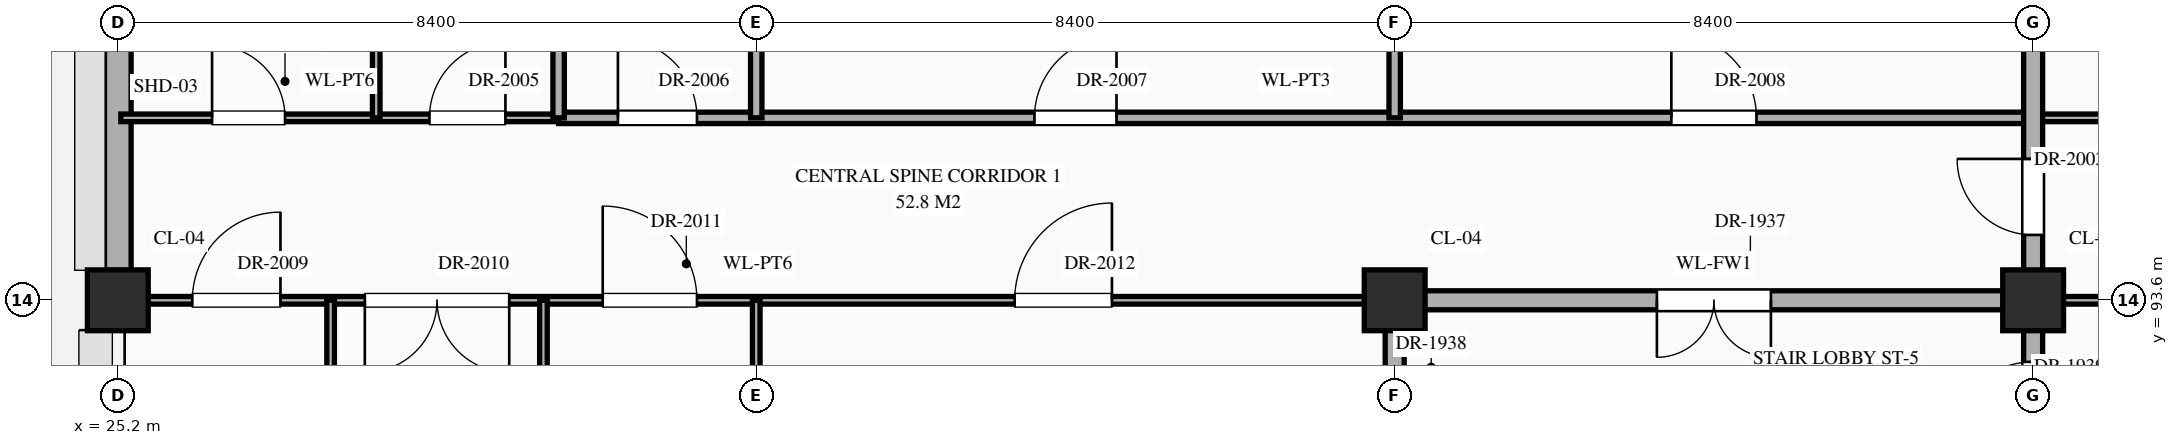
"""IFC4 building model, lengths in metres.
Left out: names, types, materials, properties, quantities, classifications, styles, units other than length and angle.
Written with IfcOpenShell. Run it as: python <this file> out.ifc"""

import sys

from ifc_helpers import new_model, si_unit, direction, frame, frame_2d, origin, origin_2d, place, context, subcontext, project, spatial, rectangle, extrude, element, fill, save


model = new_model("IFC4")
c1 = context("Model", 3, precision=1e-05, world=origin(), true_north=direction((0.0, 1.0)))
c2 = subcontext(c1, "Body", "Model", "MODEL_VIEW")
j1 = project(units=[si_unit("LENGTHUNIT", "METRE"), si_unit("PLANEANGLEUNIT", "RADIAN")], contexts=[c1])
p1 = place(None, origin())
s1 = spatial("IfcSite", under=j1, at=p1, CompositionType="ELEMENT")
p2 = place(p1, origin())
s2 = spatial("IfcBuilding", under=s1, at=p2, CompositionType="ELEMENT")
p3 = place(p2, frame((0.0, 0.0, 21.6)))
s3 = spatial("IfcBuildingStorey", under=s2, at=p3, CompositionType="ELEMENT", Elevation=21.6)
for number, where, z_axis, x_axis in (
    (1, (25.2, 93.6, 0.0), (0.0, 0.0, 1.0), (1.0, 0.0, 0.0)),
    (2, (42.0, 93.6, 0.0), (0.0, 0.0, 1.0), (1.0, 0.0, 0.0)),
    (3, (50.4, 93.6, 0.0), (0.0, 0.0, 1.0), (1.0, 0.0, 0.0)),
):
    element("IfcColumn", number, at=place(p3, frame(where, z_axis=z_axis, x_axis=x_axis)), inside=s3, PredefinedType="COLUMN", context=c2, shape_type="SweptSolid", body=[
        extrude(rectangle(XDim=0.8, YDim=0.8, at=origin_2d()), origin(), (0.0, 0.0, 1.0), 4.5),
    ])
p4 = place(p3, frame((25.2, 93.995, 0.0), z_axis=(0.0, 0.0, 1.0), x_axis=(0.0, 1.0, 0.0)))
e4 = element("IfcWall", 4, at=p4, inside=s3, PredefinedType="STANDARD", context=c2, shape_type="SweptSolid", body=[
    extrude(rectangle(XDim=6.41, YDim=0.35, at=frame_2d((3.205, 0.0))), origin(), (0.0, 0.0, 1.0), 3.59),
])
p5 = place(p4, frame((3.905, 0.0, 0.85)))
e5 = element("IfcOpeningElement", 5, at=p5, cuts=e4, PredefinedType="OPENING", context=c2, shape_type="SweptSolid", body=[
    extrude(rectangle(XDim=1.2, YDim=1.74, at=frame_2d((0.6, 0.87))), frame((0.0, 0.187, 0.0), z_axis=(0.0, -1.0, 0.0), x_axis=(1.0, 0.0, 0.0)), (0.0, 0.0, 1.0), 0.374),
])
p6 = place(p3, frame((25.24, 93.6, 0.0), z_axis=(0.0, 0.0, 1.0), x_axis=(1.0, 0.0, 0.0)))
e6 = element("IfcWall", 6, at=p6, inside=s3, PredefinedType="STANDARD", context=c2, shape_type="SweptSolid", body=[
    extrude(rectangle(XDim=16.76, YDim=0.1, at=frame_2d((8.38, 0.0))), origin(), (0.0, 0.0, 1.0), 3.19),
])
p7 = place(p6, frame((0.94, 0.0, 0.0)))
e7 = element("IfcOpeningElement", 7, at=p7, cuts=e6, PredefinedType="OPENING", context=c2, shape_type="SweptSolid", body=[
    extrude(rectangle(XDim=1.16, YDim=2.3, at=frame_2d((0.58, 1.15))), frame((0.0, 0.062, 0.0), z_axis=(0.0, -1.0, 0.0), x_axis=(1.0, 0.0, 0.0)), (0.0, 0.0, 1.0), 0.124),
])
p8 = place(p6, frame((3.21, 0.0, 0.0)))
e8 = element("IfcOpeningElement", 8, at=p8, cuts=e6, PredefinedType="OPENING", context=c2, shape_type="SweptSolid", body=[
    extrude(rectangle(XDim=1.9, YDim=2.5, at=frame_2d((0.95, 1.25))), frame((0.0, 0.062, 0.0), z_axis=(0.0, -1.0, 0.0), x_axis=(1.0, 0.0, 0.0)), (0.0, 0.0, 1.0), 0.124),
])
p9 = place(p6, frame((6.34, 0.0, 0.0)))
e9 = element("IfcOpeningElement", 9, at=p9, cuts=e6, PredefinedType="OPENING", context=c2, shape_type="SweptSolid", body=[
    extrude(rectangle(XDim=1.24, YDim=2.3, at=frame_2d((0.62, 1.15))), frame((0.0, 0.062, 0.0), z_axis=(0.0, -1.0, 0.0), x_axis=(1.0, 0.0, 0.0)), (0.0, 0.0, 1.0), 0.124),
])
p10 = place(p6, frame((11.76, 0.0, 0.0)))
e10 = element("IfcOpeningElement", 10, at=p10, cuts=e6, PredefinedType="OPENING", context=c2, shape_type="SweptSolid", body=[
    extrude(rectangle(XDim=1.28, YDim=2.35, at=frame_2d((0.64, 1.175))), frame((0.0, 0.062, 0.0), z_axis=(0.0, -1.0, 0.0), x_axis=(1.0, 0.0, 0.0)), (0.0, 0.0, 1.0), 0.124),
])
p11 = place(p3, frame((42.0, 93.6, 0.0), z_axis=(0.0, 0.0, 1.0), x_axis=(1.0, 0.0, 0.0)))
e11 = element("IfcWall", 11, at=p11, inside=s3, PredefinedType="STANDARD", context=c2, shape_type="SweptSolid", body=[
    extrude(rectangle(XDim=8.4, YDim=0.25, at=frame_2d((4.2, 0.0))), origin(), (0.0, 0.0, 1.0), 3.39),
])
p12 = place(p11, frame((3.45, 0.0, 0.0)))
e12 = element("IfcOpeningElement", 12, at=p12, cuts=e11, PredefinedType="OPENING", context=c2, shape_type="SweptSolid", body=[
    extrude(rectangle(XDim=1.5, YDim=2.25, at=frame_2d((0.75, 1.125))), frame((0.0, 0.137, 0.0), z_axis=(0.0, -1.0, 0.0), x_axis=(1.0, 0.0, 0.0)), (0.0, 0.0, 1.0), 0.274),
])
p13 = place(p3, frame((50.4, 93.6, 0.0), z_axis=(0.0, 0.0, 1.0), x_axis=(1.0, 0.0, 0.0)))
e13 = element("IfcWall", 13, at=p13, inside=s3, PredefinedType="STANDARD", context=c2, shape_type="SweptSolid", body=[
    extrude(rectangle(XDim=8.4, YDim=0.1, at=frame_2d((4.2, 0.0))), origin(), (0.0, 0.0, 1.0), 3.39),
])
p14 = place(p13, frame((1.1, 0.0, 0.0)))
e14 = element("IfcOpeningElement", 14, at=p14, cuts=e13, PredefinedType="OPENING", context=c2, shape_type="SweptSolid", body=[
    extrude(rectangle(XDim=0.92, YDim=2.15, at=frame_2d((0.46, 1.075))), frame((0.0, 0.062, 0.0), z_axis=(0.0, -1.0, 0.0), x_axis=(1.0, 0.0, 0.0)), (0.0, 0.0, 1.0), 0.124),
])
p15 = place(p13, frame((3.72, 0.0, 0.0)))
e15 = element("IfcOpeningElement", 15, at=p15, cuts=e13, PredefinedType="OPENING", context=c2, shape_type="SweptSolid", body=[
    extrude(rectangle(XDim=0.96, YDim=2.2, at=frame_2d((0.48, 1.1))), frame((0.0, 0.062, 0.0), z_axis=(0.0, -1.0, 0.0), x_axis=(1.0, 0.0, 0.0)), (0.0, 0.0, 1.0), 0.124),
])
p16 = place(p13, frame((6.34, 0.0, 0.0)))
e16 = element("IfcOpeningElement", 16, at=p16, cuts=e13, PredefinedType="OPENING", context=c2, shape_type="SweptSolid", body=[
    extrude(rectangle(XDim=1.0, YDim=2.25, at=frame_2d((0.5, 1.125))), frame((0.0, 0.062, 0.0), z_axis=(0.0, -1.0, 0.0), x_axis=(1.0, 0.0, 0.0)), (0.0, 0.0, 1.0), 0.124),
])
p17 = place(p3, frame((25.24, 96.0, 0.0), z_axis=(0.0, 0.0, 1.0), x_axis=(1.0, 0.0, 0.0)))
e17 = element("IfcWall", 17, at=p17, inside=s3, PredefinedType="STANDARD", context=c2, shape_type="SweptSolid", body=[
    extrude(rectangle(XDim=5.76, YDim=0.1, at=frame_2d((2.88, 0.0))), origin(), (0.0, 0.0, 1.0), 4.24),
])
p18 = place(p17, frame((1.2, 0.0, 0.0)))
e18 = element("IfcOpeningElement", 18, at=p18, cuts=e17, PredefinedType="OPENING", context=c2, shape_type="SweptSolid", body=[
    extrude(rectangle(XDim=0.96, YDim=2.2, at=frame_2d((0.48, 1.1))), frame((0.0, 0.062, 0.0), z_axis=(0.0, -1.0, 0.0), x_axis=(1.0, 0.0, 0.0)), (0.0, 0.0, 1.0), 0.124),
])
p19 = place(p17, frame((4.06, 0.0, 0.0)))
e19 = element("IfcOpeningElement", 19, at=p19, cuts=e17, PredefinedType="OPENING", context=c2, shape_type="SweptSolid", body=[
    extrude(rectangle(XDim=1.0, YDim=2.25, at=frame_2d((0.5, 1.125))), frame((0.0, 0.062, 0.0), z_axis=(0.0, -1.0, 0.0), x_axis=(1.0, 0.0, 0.0)), (0.0, 0.0, 1.0), 0.124),
])
p20 = place(p3, frame((31.0, 96.0, 0.0), z_axis=(0.0, 0.0, 1.0), x_axis=(1.0, 0.0, 0.0)))
e20 = element("IfcWall", 20, at=p20, inside=s3, PredefinedType="STANDARD", context=c2, shape_type="SweptSolid", body=[
    extrude(rectangle(XDim=19.4, YDim=0.15, at=frame_2d((9.7, 0.0))), origin(), (0.0, 0.0, 1.0), 4.24),
])
p21 = place(p20, frame((0.78, 0.0, 0.0)))
e21 = element("IfcOpeningElement", 21, at=p21, cuts=e20, PredefinedType="OPENING", context=c2, shape_type="SweptSolid", body=[
    extrude(rectangle(XDim=1.04, YDim=2.2, at=frame_2d((0.52, 1.1))), frame((0.0, 0.087, 0.0), z_axis=(0.0, -1.0, 0.0), x_axis=(1.0, 0.0, 0.0)), (0.0, 0.0, 1.0), 0.174),
])
p22 = place(p20, frame((6.26, 0.0, 0.0)))
e22 = element("IfcOpeningElement", 22, at=p22, cuts=e20, PredefinedType="OPENING", context=c2, shape_type="SweptSolid", body=[
    extrude(rectangle(XDim=1.08, YDim=2.25, at=frame_2d((0.54, 1.125))), frame((0.0, 0.087, 0.0), z_axis=(0.0, -1.0, 0.0), x_axis=(1.0, 0.0, 0.0)), (0.0, 0.0, 1.0), 0.174),
])
p23 = place(p20, frame((14.64, 0.0, 0.0)))
e23 = element("IfcOpeningElement", 23, at=p23, cuts=e20, PredefinedType="OPENING", context=c2, shape_type="SweptSolid", body=[
    extrude(rectangle(XDim=1.12, YDim=2.25, at=frame_2d((0.56, 1.125))), frame((0.0, 0.087, 0.0), z_axis=(0.0, -1.0, 0.0), x_axis=(1.0, 0.0, 0.0)), (0.0, 0.0, 1.0), 0.174),
])
p24 = place(p3, frame((50.4, 96.0, 0.0), z_axis=(0.0, 0.0, 1.0), x_axis=(1.0, 0.0, 0.0)))
e24 = element("IfcWall", 24, at=p24, inside=s3, PredefinedType="STANDARD", context=c2, shape_type="SweptSolid", body=[
    extrude(rectangle(XDim=5.8, YDim=0.1, at=frame_2d((2.9, 0.0))), origin(), (0.0, 0.0, 1.0), 4.24),
])
p25 = place(p24, frame((1.21, 0.0, 0.0)))
e25 = element("IfcOpeningElement", 25, at=p25, cuts=e24, PredefinedType="OPENING", context=c2, shape_type="SweptSolid", body=[
    extrude(rectangle(XDim=0.98, YDim=2.35, at=frame_2d((0.49, 1.175))), frame((0.0, 0.062, 0.0), z_axis=(0.0, -1.0, 0.0), x_axis=(1.0, 0.0, 0.0)), (0.0, 0.0, 1.0), 0.124),
])
p26 = place(p24, frame((4.09, 0.0, 0.0)))
e26 = element("IfcOpeningElement", 26, at=p26, cuts=e24, PredefinedType="OPENING", context=c2, shape_type="SweptSolid", body=[
    extrude(rectangle(XDim=1.02, YDim=2.4, at=frame_2d((0.51, 1.2))), frame((0.0, 0.062, 0.0), z_axis=(0.0, -1.0, 0.0), x_axis=(1.0, 0.0, 0.0)), (0.0, 0.0, 1.0), 0.124),
])
p27 = place(p3, frame((28.0, 86.4, 0.0), z_axis=(0.0, 0.0, 1.0), x_axis=(0.0, 1.0, 0.0)))
e27 = element("IfcWall", 27, at=p27, inside=s3, PredefinedType="STANDARD", context=c2, shape_type="SweptSolid", body=[
    extrude(rectangle(XDim=7.2, YDim=0.1, at=frame_2d((3.6, 0.0))), origin(), (0.0, 0.0, 1.0), 4.24),
])
p28 = place(p27, frame((3.08, 0.0, 0.0)))
e28 = element("IfcOpeningElement", 28, at=p28, cuts=e27, PredefinedType="OPENING", context=c2, shape_type="SweptSolid", body=[
    extrude(rectangle(XDim=1.04, YDim=2.2, at=frame_2d((0.52, 1.1))), frame((0.0, 0.062, 0.0), z_axis=(0.0, -1.0, 0.0), x_axis=(1.0, 0.0, 0.0)), (0.0, 0.0, 1.0), 0.124),
])
p29 = place(p3, frame((28.6, 96.0, 0.0), z_axis=(0.0, 0.0, 1.0), x_axis=(0.0, 1.0, 0.0)))
e29 = element("IfcWall", 29, at=p29, inside=s3, PredefinedType="STANDARD", context=c2, shape_type="SweptSolid", body=[
    extrude(rectangle(XDim=4.8, YDim=0.1, at=frame_2d((2.4, 0.0))), origin(), (0.0, 0.0, 1.0), 4.24),
])
p30 = place(p29, frame((1.93, 0.0, 0.0)))
e30 = element("IfcOpeningElement", 30, at=p30, cuts=e29, PredefinedType="OPENING", context=c2, shape_type="SweptSolid", body=[
    extrude(rectangle(XDim=0.94, YDim=2.3, at=frame_2d((0.47, 1.15))), frame((0.0, 0.062, 0.0), z_axis=(0.0, -1.0, 0.0), x_axis=(1.0, 0.0, 0.0)), (0.0, 0.0, 1.0), 0.124),
])
p31 = place(p3, frame((30.8, 86.4, 0.0), z_axis=(0.0, 0.0, 1.0), x_axis=(0.0, 1.0, 0.0)))
e31 = element("IfcWall", 31, at=p31, inside=s3, PredefinedType="STANDARD", context=c2, shape_type="SweptSolid", body=[
    extrude(rectangle(XDim=7.2, YDim=0.1, at=frame_2d((3.6, 0.0))), origin(), (0.0, 0.0, 1.0), 4.24),
])
p32 = place(p31, frame((3.04, 0.0, 0.0)))
e32 = element("IfcOpeningElement", 32, at=p32, cuts=e31, PredefinedType="OPENING", context=c2, shape_type="SweptSolid", body=[
    extrude(rectangle(XDim=1.12, YDim=2.25, at=frame_2d((0.56, 1.125))), frame((0.0, 0.062, 0.0), z_axis=(0.0, -1.0, 0.0), x_axis=(1.0, 0.0, 0.0)), (0.0, 0.0, 1.0), 0.124),
])
p33 = place(p3, frame((31.0, 96.0, 0.0), z_axis=(0.0, 0.0, 1.0), x_axis=(0.0, 1.0, 0.0)))
e33 = element("IfcWall", 33, at=p33, inside=s3, PredefinedType="STANDARD", context=c2, shape_type="SweptSolid", body=[
    extrude(rectangle(XDim=4.8, YDim=0.15, at=frame_2d((2.4, 0.0))), origin(), (0.0, 0.0, 1.0), 4.24),
])
p34 = place(p33, frame((1.91, 0.0, 0.0)))
e34 = element("IfcOpeningElement", 34, at=p34, cuts=e33, PredefinedType="OPENING", context=c2, shape_type="SweptSolid", body=[
    extrude(rectangle(XDim=0.98, YDim=2.35, at=frame_2d((0.49, 1.175))), frame((0.0, 0.087, 0.0), z_axis=(0.0, -1.0, 0.0), x_axis=(1.0, 0.0, 0.0)), (0.0, 0.0, 1.0), 0.174),
])
p35 = place(p3, frame((33.6, 86.4, 0.0), z_axis=(0.0, 0.0, 1.0), x_axis=(0.0, 1.0, 0.0)))
e35 = element("IfcWall", 35, at=p35, inside=s3, PredefinedType="STANDARD", context=c2, shape_type="SweptSolid", body=[
    extrude(rectangle(XDim=7.2, YDim=0.1, at=frame_2d((3.6, 0.0))), origin(), (0.0, 0.0, 1.0), 4.24),
])
p36 = place(p3, frame((33.6, 96.0, 0.0), z_axis=(0.0, 0.0, 1.0), x_axis=(0.0, 1.0, 0.0)))
e36 = element("IfcWall", 36, at=p36, inside=s3, PredefinedType="STANDARD", context=c2, shape_type="SweptSolid", body=[
    extrude(rectangle(XDim=4.8, YDim=0.15, at=frame_2d((2.4, 0.0))), origin(), (0.0, 0.0, 1.0), 4.24),
])
p37 = place(p3, frame((42.0, 91.2, 0.0), z_axis=(0.0, 0.0, 1.0), x_axis=(0.0, 1.0, 0.0)))
e37 = element("IfcWall", 37, at=p37, inside=s3, PredefinedType="STANDARD", context=c2, shape_type="SweptSolid", body=[
    extrude(rectangle(XDim=2.4, YDim=0.25, at=frame_2d((1.2, 0.0))), origin(), (0.0, 0.0, 1.0), 3.49),
])
p38 = place(p37, frame((0.565, 0.0, 0.0)))
e38 = element("IfcOpeningElement", 38, at=p38, cuts=e37, PredefinedType="OPENING", context=c2, shape_type="SweptSolid", body=[
    extrude(rectangle(XDim=0.95, YDim=2.15, at=frame_2d((0.475, 1.075))), frame((0.0, 0.137, 0.0), z_axis=(0.0, -1.0, 0.0), x_axis=(1.0, 0.0, 0.0)), (0.0, 0.0, 1.0), 0.274),
])
p39 = place(p3, frame((42.0, 96.0, 0.0), z_axis=(0.0, 0.0, 1.0), x_axis=(0.0, 1.0, 0.0)))
e39 = element("IfcWall", 39, at=p39, inside=s3, PredefinedType="STANDARD", context=c2, shape_type="SweptSolid", body=[
    extrude(rectangle(XDim=4.8, YDim=0.15, at=frame_2d((2.4, 0.0))), origin(), (0.0, 0.0, 1.0), 3.49),
])
p40 = place(p3, frame((50.4, 91.2, 0.0), z_axis=(0.0, 0.0, 1.0), x_axis=(0.0, 1.0, 0.0)))
e40 = element("IfcWall", 40, at=p40, inside=s3, PredefinedType="STANDARD", context=c2, shape_type="SweptSolid", body=[
    extrude(rectangle(XDim=13.2, YDim=0.25, at=frame_2d((6.6, 0.0))), origin(), (0.0, 0.0, 1.0), 3.49),
])
p41 = place(p40, frame((0.49, 0.0, 0.0)))
e41 = element("IfcOpeningElement", 41, at=p41, cuts=e40, PredefinedType="OPENING", context=c2, shape_type="SweptSolid", body=[
    extrude(rectangle(XDim=1.1, YDim=2.2, at=frame_2d((0.55, 1.1))), frame((0.0, 0.137, 0.0), z_axis=(0.0, -1.0, 0.0), x_axis=(1.0, 0.0, 0.0)), (0.0, 0.0, 1.0), 0.274),
])
p42 = place(p40, frame((10.485, 0.0, 0.0)))
e42 = element("IfcOpeningElement", 42, at=p42, cuts=e40, PredefinedType="OPENING", context=c2, shape_type="SweptSolid", body=[
    extrude(rectangle(XDim=0.95, YDim=2.15, at=frame_2d((0.475, 1.075))), frame((0.0, 0.137, 0.0), z_axis=(0.0, -1.0, 0.0), x_axis=(1.0, 0.0, 0.0)), (0.0, 0.0, 1.0), 0.274),
])
p43 = place(p40, frame((3.26, 0.0, 0.0)))
e43 = element("IfcOpeningElement", 43, at=p43, cuts=e40, PredefinedType="OPENING", context=c2, shape_type="SweptSolid", body=[
    extrude(rectangle(XDim=1.0, YDim=2.2, at=frame_2d((0.5, 1.1))), frame((0.0, 0.137, 0.0), z_axis=(0.0, -1.0, 0.0), x_axis=(1.0, 0.0, 0.0)), (0.0, 0.0, 1.0), 0.274),
])
p44 = place(p12, frame((1.5, 0.0, 0.0), z_axis=(0.0, 0.0, 1.0), x_axis=(-1.0, 0.0, 0.0)))
e44 = element("IfcDoor", 44, at=p44, inside=s3, OperationType="DOUBLE_DOOR_SINGLE_SWING", PredefinedType="DOOR", context=c2, shape_type="SweptSolid", body=[
    extrude(rectangle(XDim=1.5, YDim=2.25, at=frame_2d((0.75, 1.125))), frame((0.0, 0.025, 0.0), z_axis=(0.0, -1.0, 0.0), x_axis=(1.0, 0.0, 0.0)), (0.0, 0.0, 1.0), 0.05),
])
fill(e12, e44)
p45 = place(p41, origin())
e45 = element("IfcDoor", 45, at=p45, inside=s3, OperationType="SINGLE_SWING_LEFT", PredefinedType="DOOR", context=c2, shape_type="SweptSolid", body=[
    extrude(rectangle(XDim=1.1, YDim=2.2, at=frame_2d((0.55, 1.1))), frame((0.0, 0.025, 0.0), z_axis=(0.0, -1.0, 0.0), x_axis=(1.0, 0.0, 0.0)), (0.0, 0.0, 1.0), 0.05),
])
fill(e41, e45)
p46 = place(p43, origin())
e46 = element("IfcDoor", 46, at=p46, inside=s3, OperationType="SINGLE_SWING_RIGHT", PredefinedType="DOOR", context=c2, shape_type="SweptSolid", body=[
    extrude(rectangle(XDim=1.0, YDim=2.2, at=frame_2d((0.5, 1.1))), frame((0.0, 0.025, 0.0), z_axis=(0.0, -1.0, 0.0), x_axis=(1.0, 0.0, 0.0)), (0.0, 0.0, 1.0), 0.05),
])
fill(e43, e46)
p47 = place(p18, origin())
e47 = element("IfcDoor", 47, at=p47, inside=s3, OperationType="SINGLE_SWING_LEFT", PredefinedType="DOOR", context=c2, shape_type="SweptSolid", body=[
    extrude(rectangle(XDim=0.96, YDim=2.2, at=frame_2d((0.48, 1.1))), frame((0.0, 0.025, 0.0), z_axis=(0.0, -1.0, 0.0), x_axis=(1.0, 0.0, 0.0)), (0.0, 0.0, 1.0), 0.05),
])
fill(e18, e47)
p48 = place(p19, origin())
e48 = element("IfcDoor", 48, at=p48, inside=s3, OperationType="SINGLE_SWING_RIGHT", PredefinedType="DOOR", context=c2, shape_type="SweptSolid", body=[
    extrude(rectangle(XDim=1.0, YDim=2.25, at=frame_2d((0.5, 1.125))), frame((0.0, 0.025, 0.0), z_axis=(0.0, -1.0, 0.0), x_axis=(1.0, 0.0, 0.0)), (0.0, 0.0, 1.0), 0.05),
])
fill(e19, e48)
p49 = place(p21, origin())
e49 = element("IfcDoor", 49, at=p49, inside=s3, OperationType="SINGLE_SWING_LEFT", PredefinedType="DOOR", context=c2, shape_type="SweptSolid", body=[
    extrude(rectangle(XDim=1.04, YDim=2.2, at=frame_2d((0.52, 1.1))), frame((0.0, 0.025, 0.0), z_axis=(0.0, -1.0, 0.0), x_axis=(1.0, 0.0, 0.0)), (0.0, 0.0, 1.0), 0.05),
])
fill(e21, e49)
p50 = place(p22, origin())
e50 = element("IfcDoor", 50, at=p50, inside=s3, OperationType="SINGLE_SWING_RIGHT", PredefinedType="DOOR", context=c2, shape_type="SweptSolid", body=[
    extrude(rectangle(XDim=1.08, YDim=2.25, at=frame_2d((0.54, 1.125))), frame((0.0, 0.025, 0.0), z_axis=(0.0, -1.0, 0.0), x_axis=(1.0, 0.0, 0.0)), (0.0, 0.0, 1.0), 0.05),
])
fill(e22, e50)
p51 = place(p23, origin())
e51 = element("IfcDoor", 51, at=p51, inside=s3, OperationType="SINGLE_SWING_LEFT", PredefinedType="DOOR", context=c2, shape_type="SweptSolid", body=[
    extrude(rectangle(XDim=1.12, YDim=2.25, at=frame_2d((0.56, 1.125))), frame((0.0, 0.025, 0.0), z_axis=(0.0, -1.0, 0.0), x_axis=(1.0, 0.0, 0.0)), (0.0, 0.0, 1.0), 0.05),
])
fill(e23, e51)
p52 = place(p7, origin())
e52 = element("IfcDoor", 52, at=p52, inside=s3, OperationType="SINGLE_SWING_RIGHT", PredefinedType="DOOR", context=c2, shape_type="SweptSolid", body=[
    extrude(rectangle(XDim=1.16, YDim=2.3, at=frame_2d((0.58, 1.15))), frame((0.0, 0.025, 0.0), z_axis=(0.0, -1.0, 0.0), x_axis=(1.0, 0.0, 0.0)), (0.0, 0.0, 1.0), 0.05),
])
fill(e7, e52)
p53 = place(p8, frame((1.9, 0.0, 0.0), z_axis=(0.0, 0.0, 1.0), x_axis=(-1.0, 0.0, 0.0)))
e53 = element("IfcDoor", 53, at=p53, inside=s3, OperationType="DOUBLE_DOOR_SINGLE_SWING", PredefinedType="DOOR", context=c2, shape_type="SweptSolid", body=[
    extrude(rectangle(XDim=1.9, YDim=2.5, at=frame_2d((0.95, 1.25))), frame((0.0, 0.025, 0.0), z_axis=(0.0, -1.0, 0.0), x_axis=(1.0, 0.0, 0.0)), (0.0, 0.0, 1.0), 0.05),
])
fill(e8, e53)
p54 = place(p9, origin())
e54 = element("IfcDoor", 54, at=p54, inside=s3, OperationType="SINGLE_SWING_LEFT", PredefinedType="DOOR", context=c2, shape_type="SweptSolid", body=[
    extrude(rectangle(XDim=1.24, YDim=2.3, at=frame_2d((0.62, 1.15))), frame((0.0, 0.025, 0.0), z_axis=(0.0, -1.0, 0.0), x_axis=(1.0, 0.0, 0.0)), (0.0, 0.0, 1.0), 0.05),
])
fill(e9, e54)
p55 = place(p10, origin())
e55 = element("IfcDoor", 55, at=p55, inside=s3, OperationType="SINGLE_SWING_RIGHT", PredefinedType="DOOR", context=c2, shape_type="SweptSolid", body=[
    extrude(rectangle(XDim=1.28, YDim=2.35, at=frame_2d((0.64, 1.175))), frame((0.0, 0.025, 0.0), z_axis=(0.0, -1.0, 0.0), x_axis=(1.0, 0.0, 0.0)), (0.0, 0.0, 1.0), 0.05),
])
fill(e10, e55)
save(model, sys.argv[1])
